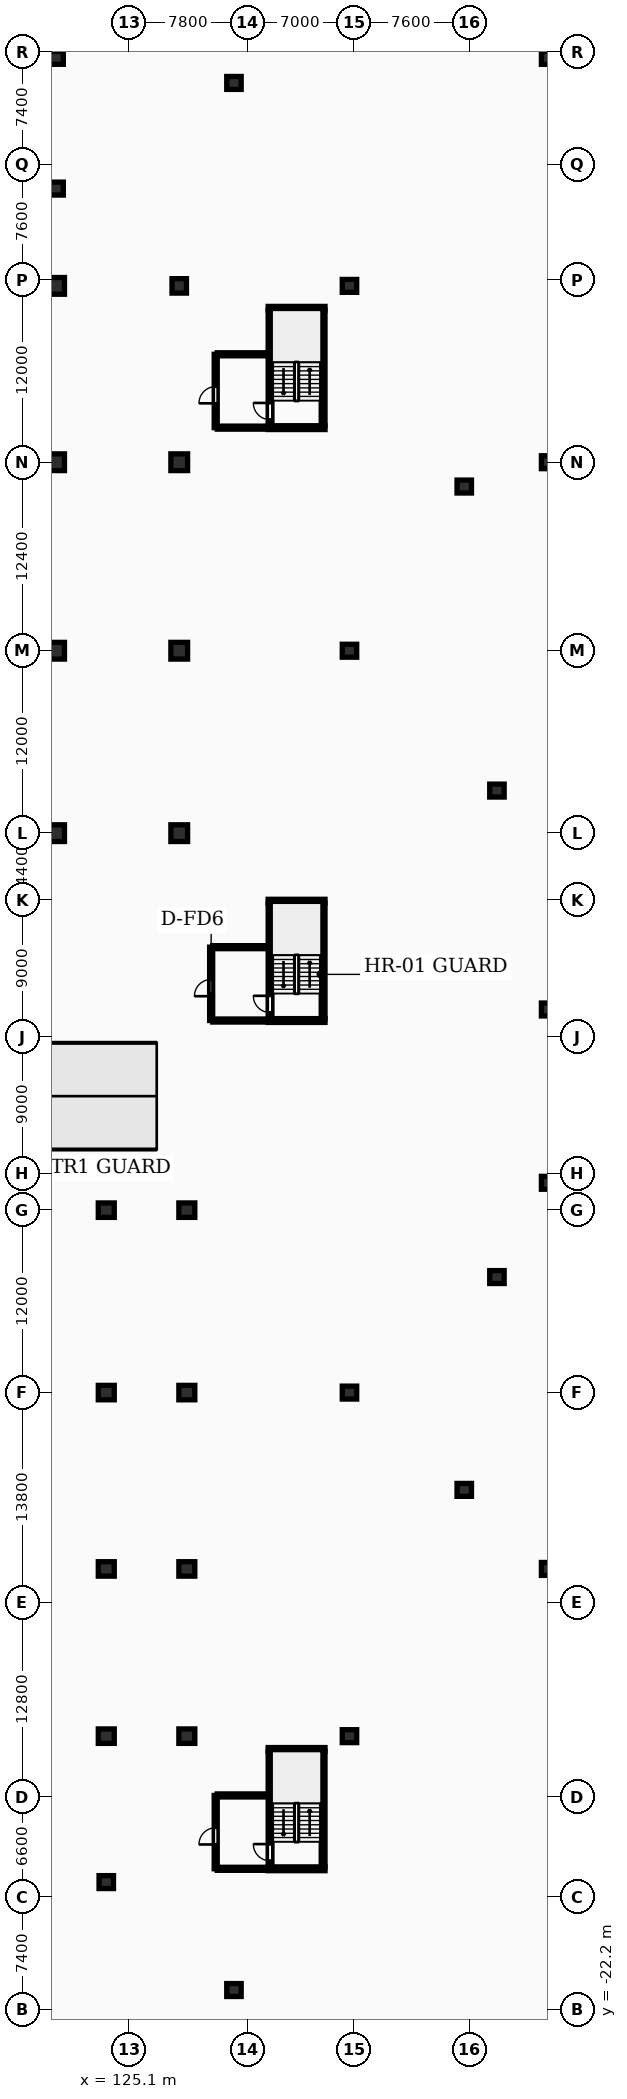
"""IFC4 building model, lengths in metres.
Left out: names, types, materials, properties, quantities, classifications, styles, units other than length and angle.
Written with IfcOpenShell. Run it as: python <this file> out.ifc"""

import sys

from ifc_helpers import new_model, si_unit, direction, frame, frame_2d, origin, origin_2d, place, context, subcontext, project, spatial, rectangle, circle, extrude, element, fill, save


model = new_model("IFC4")
c1 = context("Model", 3, precision=1e-05, world=origin(), true_north=direction((0.0, 1.0)))
c2 = subcontext(c1, "Body", "Model", "MODEL_VIEW")
j1 = project(units=[si_unit("LENGTHUNIT", "METRE"), si_unit("PLANEANGLEUNIT", "RADIAN")], contexts=[c1])
p1 = place(None, origin())
s1 = spatial("IfcSite", under=j1, at=p1, CompositionType="ELEMENT")
p2 = place(p1, origin())
s2 = spatial("IfcBuilding", under=s1, at=p2, CompositionType="ELEMENT")
p3 = place(p2, frame((0.0, 0.0, -7.2)))
s3 = spatial("IfcBuildingStorey", under=s2, at=p3, CompositionType="ELEMENT", Elevation=-7.2)
for number, where, z_axis, x_axis in (
    (1, (120.3, 55.2, 0.0), (0.0, 0.0, 1.0), (1.0, 0.0, 0.0)),
    (2, (120.3, 67.2, 0.0), (0.0, 0.0, 1.0), (1.0, 0.0, 0.0)),
    (3, (120.3, 79.6, 0.0), (0.0, 0.0, 1.0), (1.0, 0.0, 0.0)),
    (4, (120.3, 91.2, 0.0), (0.0, 0.0, 1.0), (1.0, 0.0, 0.0)),
    (5, (128.4, 55.2, 0.0), (0.0, 0.0, 1.0), (1.0, 0.0, 0.0)),
    (6, (128.4, 67.2, 0.0), (0.0, 0.0, 1.0), (1.0, 0.0, 0.0)),
    (7, (128.4, 79.6, 0.0), (0.0, 0.0, 1.0), (1.0, 0.0, 0.0)),
):
    element("IfcColumn", number, at=place(p3, frame(where, z_axis=z_axis, x_axis=x_axis)), inside=s3, PredefinedType="COLUMN", context=c2, shape_type="SweptSolid", body=[
        extrude(rectangle(XDim=1.1, YDim=1.1, at=origin_2d()), origin(), (0.0, 0.0, 1.0), 3.6),
    ])
p4 = place(p3, frame((128.4, 91.2, 0.0), z_axis=(0.0, 0.0, 1.0), x_axis=(1.0, 0.0, 0.0)))
e8 = element("IfcColumn", 8, at=p4, inside=s3, PredefinedType="COLUMN", context=c2, shape_type="SweptSolid", body=[
    extrude(circle(Radius=0.475, at=origin_2d()), origin(), (0.0, 0.0, 1.0), 3.6),
])
for number, where, z_axis, x_axis in (
    (9, (123.6, -4.2, 0.0), (0.0, 0.0, 1.0), (1.0, 0.0, 0.0)),
    (10, (123.6, 6.8, 0.0), (0.0, 0.0, 1.0), (1.0, 0.0, 0.0)),
    (11, (123.6, 18.4, 0.0), (0.0, 0.0, 1.0), (1.0, 0.0, 0.0)),
    (12, (123.6, 30.4, 0.0), (0.0, 0.0, 1.0), (1.0, 0.0, 0.0)),
    (13, (128.9, -4.2, 0.0), (0.0, 0.0, 1.0), (1.0, 0.0, 0.0)),
    (14, (128.9, 6.8, 0.0), (0.0, 0.0, 1.0), (1.0, 0.0, 0.0)),
    (15, (128.9, 18.4, 0.0), (0.0, 0.0, 1.0), (1.0, 0.0, 0.0)),
    (16, (128.9, 30.4, 0.0), (0.0, 0.0, 1.0), (1.0, 0.0, 0.0)),
):
    element("IfcColumn", number, at=place(p3, frame(where, z_axis=z_axis, x_axis=x_axis)), inside=s3, PredefinedType="COLUMN", context=c2, shape_type="SweptSolid", body=[
        extrude(rectangle(XDim=1.05, YDim=0.95, at=origin_2d()), origin(), (0.0, 0.0, 1.0), 3.6),
    ])
for number, where, z_axis, x_axis in (
    (17, (139.6, -4.2, 0.0), (0.0, 0.0, 1.0), (1.0, 0.0, 0.0)),
    (18, (139.6, 18.4, 0.0), (0.0, 0.0, 1.0), (1.0, 0.0, 0.0)),
    (19, (139.6, 67.2, 0.0), (0.0, 0.0, 1.0), (1.0, 0.0, 0.0)),
    (20, (139.6, 91.2, 0.0), (0.0, 0.0, 1.0), (1.0, 0.0, 0.0)),
    (21, (123.6, -13.8, 0.0), (0.0, 0.0, 1.0), (1.0, 0.0, 0.0)),
    (22, (120.3, 97.6, 0.0), (0.0, 0.0, 1.0), (1.0, 0.0, 0.0)),
    (23, (132.0, -20.9, 0.0), (0.0, 0.0, 1.0), (1.0, 0.0, 0.0)),
    (24, (132.0, 104.55, 0.0), (0.0, 0.0, 1.0), (1.0, 0.0, 0.0)),
    (25, (149.3, 26.0, 0.0), (0.0, 0.0, 1.0), (1.0, 0.0, 0.0)),
    (26, (149.3, 58.0, 0.0), (0.0, 0.0, 1.0), (1.0, 0.0, 0.0)),
    (27, (147.15, 12.0, 0.0), (0.0, 0.0, 1.0), (1.0, 0.0, 0.0)),
    (28, (147.15, 78.0, 0.0), (0.0, 0.0, 1.0), (1.0, 0.0, 0.0)),
    (29, (152.7, 6.8, 0.0), (0.0, 0.0, 1.0), (1.0, 0.0, 0.0)),
    (30, (152.7, 32.2, 0.0), (0.0, 0.0, 1.0), (1.0, 0.0, 0.0)),
    (31, (152.7, 43.6, 0.0), (0.0, 0.0, 1.0), (1.0, 0.0, 0.0)),
    (32, (152.7, 79.6, 0.0), (0.0, 0.0, 1.0), (1.0, 0.0, 0.0)),
    (33, (152.7, 106.2, 0.0), (0.0, 0.0, 1.0), (1.0, 0.0, 0.0)),
    (34, (120.3, 106.2, 0.0), (0.0, 0.0, 1.0), (1.0, 0.0, 0.0)),
):
    element("IfcColumn", number, at=place(p3, frame(where, z_axis=z_axis, x_axis=x_axis)), inside=s3, PredefinedType="COLUMN", context=c2, shape_type="SweptSolid", body=[
        extrude(rectangle(XDim=0.95, YDim=0.85, at=origin_2d()), origin(), (0.0, 0.0, 1.0), 3.6),
    ])
p5 = place(p3, frame((134.375, 43.0, 0.0), z_axis=(0.0, 0.0, 1.0), x_axis=(0.0, 1.0, 0.0)))
e35 = element("IfcWall", 35, at=p5, inside=s3, PredefinedType="SHEAR", context=c2, shape_type="SweptSolid", body=[
    extrude(rectangle(XDim=7.6, YDim=0.25, at=frame_2d((3.8, 0.0))), origin(), (0.0, 0.0, 1.0), 3.6),
])
p6 = place(p5, frame((0.4, 0.0, 0.0)))
e36 = element("IfcOpeningElement", 36, at=p6, cuts=e35, PredefinedType="OPENING", context=c2, shape_type="SweptSolid", body=[
    extrude(rectangle(XDim=1.1, YDim=2.1, at=frame_2d((0.55, 1.05))), frame((0.0, 0.135, 0.0), z_axis=(0.0, -1.0, 0.0), x_axis=(1.0, 0.0, 0.0)), (0.0, 0.0, 1.0), 0.27),
])
p7 = place(p3, frame((137.865, 43.0, 0.0), z_axis=(0.0, 0.0, 1.0), x_axis=(0.0, 1.0, 0.0)))
e37 = element("IfcWall", 37, at=p7, inside=s3, PredefinedType="SHEAR", context=c2, shape_type="SweptSolid", body=[
    extrude(rectangle(XDim=7.6, YDim=0.25, at=frame_2d((3.8, 0.0))), origin(), (0.0, 0.0, 1.0), 3.6),
])
for number, where, z_axis, x_axis in (
    (38, (134.25, 42.875, 0.0), (0.0, 0.0, 1.0), (1.0, 0.0, 0.0)),
    (39, (134.25, 50.725, 0.0), (0.0, 0.0, 1.0), (1.0, 0.0, 0.0)),
):
    element("IfcWall", number, at=place(p3, frame(where, z_axis=z_axis, x_axis=x_axis)), inside=s3, PredefinedType="SHEAR", context=c2, shape_type="SweptSolid", body=[
        extrude(rectangle(XDim=3.74, YDim=0.25, at=frame_2d((1.87, 0.0))), origin(), (0.0, 0.0, 1.0), 3.6),
    ])
p8 = place(p3, frame((130.5, 42.875, 0.0), z_axis=(0.0, 0.0, 1.0), x_axis=(0.0, 1.0, 0.0)))
e40 = element("IfcWall", 40, at=p8, inside=s3, PredefinedType="PARTITIONING", context=c2, shape_type="SweptSolid", body=[
    extrude(rectangle(XDim=4.825, YDim=0.2, at=frame_2d((2.413, 0.0))), origin(), (0.0, 0.0, 1.0), 3.3),
])
p9 = place(p8, frame((1.6, 0.0, 0.0)))
e41 = element("IfcOpeningElement", 41, at=p9, cuts=e40, PredefinedType="OPENING", context=c2, shape_type="SweptSolid", body=[
    extrude(rectangle(XDim=1.1, YDim=2.15, at=frame_2d((0.55, 1.075))), frame((0.0, 0.11, 0.0), z_axis=(0.0, -1.0, 0.0), x_axis=(1.0, 0.0, 0.0)), (0.0, 0.0, 1.0), 0.22),
])
for number, where, z_axis, x_axis in (
    (42, (130.6, 42.875, 0.0), (0.0, 0.0, 1.0), (1.0, 0.0, 0.0)),
    (43, (130.6, 47.7, 0.0), (0.0, 0.0, 1.0), (1.0, 0.0, 0.0)),
):
    element("IfcWall", number, at=place(p3, frame(where, z_axis=z_axis, x_axis=x_axis)), inside=s3, PredefinedType="PARTITIONING", context=c2, shape_type="SweptSolid", body=[
        extrude(rectangle(XDim=3.65, YDim=0.2, at=frame_2d((1.825, 0.0))), origin(), (0.0, 0.0, 1.0), 3.3),
    ])
p10 = place(p3, frame((134.375, 82.0, 0.0), z_axis=(0.0, 0.0, 1.0), x_axis=(0.0, 1.0, 0.0)))
e44 = element("IfcWall", 44, at=p10, inside=s3, PredefinedType="SHEAR", context=c2, shape_type="SweptSolid", body=[
    extrude(rectangle(XDim=7.6, YDim=0.25, at=frame_2d((3.8, 0.0))), origin(), (0.0, 0.0, 1.0), 3.6),
])
p11 = place(p10, frame((0.4, 0.0, 0.0)))
e45 = element("IfcOpeningElement", 45, at=p11, cuts=e44, PredefinedType="OPENING", context=c2, shape_type="SweptSolid", body=[
    extrude(rectangle(XDim=1.1, YDim=2.1, at=frame_2d((0.55, 1.05))), frame((0.0, 0.135, 0.0), z_axis=(0.0, -1.0, 0.0), x_axis=(1.0, 0.0, 0.0)), (0.0, 0.0, 1.0), 0.27),
])
p12 = place(p3, frame((137.865, 82.0, 0.0), z_axis=(0.0, 0.0, 1.0), x_axis=(0.0, 1.0, 0.0)))
e46 = element("IfcWall", 46, at=p12, inside=s3, PredefinedType="SHEAR", context=c2, shape_type="SweptSolid", body=[
    extrude(rectangle(XDim=7.6, YDim=0.25, at=frame_2d((3.8, 0.0))), origin(), (0.0, 0.0, 1.0), 3.6),
])
for number, where, z_axis, x_axis in (
    (47, (134.25, 81.875, 0.0), (0.0, 0.0, 1.0), (1.0, 0.0, 0.0)),
    (48, (134.25, 89.725, 0.0), (0.0, 0.0, 1.0), (1.0, 0.0, 0.0)),
):
    element("IfcWall", number, at=place(p3, frame(where, z_axis=z_axis, x_axis=x_axis)), inside=s3, PredefinedType="SHEAR", context=c2, shape_type="SweptSolid", body=[
        extrude(rectangle(XDim=3.74, YDim=0.25, at=frame_2d((1.87, 0.0))), origin(), (0.0, 0.0, 1.0), 3.6),
    ])
p13 = place(p3, frame((130.8, 81.875, 0.0), z_axis=(0.0, 0.0, 1.0), x_axis=(0.0, 1.0, 0.0)))
e49 = element("IfcWall", 49, at=p13, inside=s3, PredefinedType="PARTITIONING", context=c2, shape_type="SweptSolid", body=[
    extrude(rectangle(XDim=4.825, YDim=0.2, at=frame_2d((2.413, 0.0))), origin(), (0.0, 0.0, 1.0), 3.3),
])
p14 = place(p13, frame((1.6, 0.0, 0.0)))
e50 = element("IfcOpeningElement", 50, at=p14, cuts=e49, PredefinedType="OPENING", context=c2, shape_type="SweptSolid", body=[
    extrude(rectangle(XDim=1.1, YDim=2.15, at=frame_2d((0.55, 1.075))), frame((0.0, 0.11, 0.0), z_axis=(0.0, -1.0, 0.0), x_axis=(1.0, 0.0, 0.0)), (0.0, 0.0, 1.0), 0.22),
])
for number, where, z_axis, x_axis in (
    (51, (130.9, 81.875, 0.0), (0.0, 0.0, 1.0), (1.0, 0.0, 0.0)),
    (52, (130.9, 86.7, 0.0), (0.0, 0.0, 1.0), (1.0, 0.0, 0.0)),
):
    element("IfcWall", number, at=place(p3, frame(where, z_axis=z_axis, x_axis=x_axis)), inside=s3, PredefinedType="PARTITIONING", context=c2, shape_type="SweptSolid", body=[
        extrude(rectangle(XDim=3.35, YDim=0.2, at=frame_2d((1.675, 0.0))), origin(), (0.0, 0.0, 1.0), 3.3),
    ])
p15 = place(p3, frame((134.375, -12.8, 0.0), z_axis=(0.0, 0.0, 1.0), x_axis=(0.0, 1.0, 0.0)))
e53 = element("IfcWall", 53, at=p15, inside=s3, PredefinedType="SHEAR", context=c2, shape_type="SweptSolid", body=[
    extrude(rectangle(XDim=7.6, YDim=0.25, at=frame_2d((3.8, 0.0))), origin(), (0.0, 0.0, 1.0), 3.6),
])
p16 = place(p15, frame((0.4, 0.0, 0.0)))
e54 = element("IfcOpeningElement", 54, at=p16, cuts=e53, PredefinedType="OPENING", context=c2, shape_type="SweptSolid", body=[
    extrude(rectangle(XDim=1.1, YDim=2.1, at=frame_2d((0.55, 1.05))), frame((0.0, 0.135, 0.0), z_axis=(0.0, -1.0, 0.0), x_axis=(1.0, 0.0, 0.0)), (0.0, 0.0, 1.0), 0.27),
])
p17 = place(p3, frame((137.865, -12.8, 0.0), z_axis=(0.0, 0.0, 1.0), x_axis=(0.0, 1.0, 0.0)))
e55 = element("IfcWall", 55, at=p17, inside=s3, PredefinedType="SHEAR", context=c2, shape_type="SweptSolid", body=[
    extrude(rectangle(XDim=7.6, YDim=0.25, at=frame_2d((3.8, 0.0))), origin(), (0.0, 0.0, 1.0), 3.6),
])
for number, where, z_axis, x_axis in (
    (56, (134.25, -12.925, 0.0), (0.0, 0.0, 1.0), (1.0, 0.0, 0.0)),
    (57, (134.25, -5.075, 0.0), (0.0, 0.0, 1.0), (1.0, 0.0, 0.0)),
):
    element("IfcWall", number, at=place(p3, frame(where, z_axis=z_axis, x_axis=x_axis)), inside=s3, PredefinedType="SHEAR", context=c2, shape_type="SweptSolid", body=[
        extrude(rectangle(XDim=3.74, YDim=0.25, at=frame_2d((1.87, 0.0))), origin(), (0.0, 0.0, 1.0), 3.6),
    ])
p18 = place(p3, frame((130.8, -12.925, 0.0), z_axis=(0.0, 0.0, 1.0), x_axis=(0.0, 1.0, 0.0)))
e58 = element("IfcWall", 58, at=p18, inside=s3, PredefinedType="PARTITIONING", context=c2, shape_type="SweptSolid", body=[
    extrude(rectangle(XDim=4.825, YDim=0.2, at=frame_2d((2.413, 0.0))), origin(), (0.0, 0.0, 1.0), 3.3),
])
p19 = place(p18, frame((1.6, 0.0, 0.0)))
e59 = element("IfcOpeningElement", 59, at=p19, cuts=e58, PredefinedType="OPENING", context=c2, shape_type="SweptSolid", body=[
    extrude(rectangle(XDim=1.1, YDim=2.15, at=frame_2d((0.55, 1.075))), frame((0.0, 0.11, 0.0), z_axis=(0.0, -1.0, 0.0), x_axis=(1.0, 0.0, 0.0)), (0.0, 0.0, 1.0), 0.22),
])
for number, where, z_axis, x_axis in (
    (60, (130.9, -12.925, 0.0), (0.0, 0.0, 1.0), (1.0, 0.0, 0.0)),
    (61, (130.9, -8.1, 0.0), (0.0, 0.0, 1.0), (1.0, 0.0, 0.0)),
):
    element("IfcWall", number, at=place(p3, frame(where, z_axis=z_axis, x_axis=x_axis)), inside=s3, PredefinedType="PARTITIONING", context=c2, shape_type="SweptSolid", body=[
        extrude(rectangle(XDim=3.35, YDim=0.2, at=frame_2d((1.675, 0.0))), origin(), (0.0, 0.0, 1.0), 3.3),
    ])
p20 = place(p6, origin())
e62 = element("IfcDoor", 62, at=p20, inside=s3, OperationType="SINGLE_SWING_RIGHT", PredefinedType="DOOR", context=c2, shape_type="SweptSolid", body=[
    extrude(rectangle(XDim=1.1, YDim=2.1, at=frame_2d((0.55, 1.05))), frame((0.0, 0.025, 0.0), z_axis=(0.0, -1.0, 0.0), x_axis=(1.0, 0.0, 0.0)), (0.0, 0.0, 1.0), 0.05),
])
fill(e36, e62)
p21 = place(p9, origin())
e63 = element("IfcDoor", 63, at=p21, inside=s3, OperationType="SINGLE_SWING_LEFT", PredefinedType="DOOR", context=c2, shape_type="SweptSolid", body=[
    extrude(rectangle(XDim=1.1, YDim=2.15, at=frame_2d((0.55, 1.075))), frame((0.0, 0.025, 0.0), z_axis=(0.0, -1.0, 0.0), x_axis=(1.0, 0.0, 0.0)), (0.0, 0.0, 1.0), 0.05),
])
fill(e41, e63)
p22 = place(p11, origin())
e64 = element("IfcDoor", 64, at=p22, inside=s3, OperationType="SINGLE_SWING_RIGHT", PredefinedType="DOOR", context=c2, shape_type="SweptSolid", body=[
    extrude(rectangle(XDim=1.1, YDim=2.1, at=frame_2d((0.55, 1.05))), frame((0.0, 0.025, 0.0), z_axis=(0.0, -1.0, 0.0), x_axis=(1.0, 0.0, 0.0)), (0.0, 0.0, 1.0), 0.05),
])
fill(e45, e64)
p23 = place(p14, origin())
e65 = element("IfcDoor", 65, at=p23, inside=s3, OperationType="SINGLE_SWING_LEFT", PredefinedType="DOOR", context=c2, shape_type="SweptSolid", body=[
    extrude(rectangle(XDim=1.1, YDim=2.15, at=frame_2d((0.55, 1.075))), frame((0.0, 0.025, 0.0), z_axis=(0.0, -1.0, 0.0), x_axis=(1.0, 0.0, 0.0)), (0.0, 0.0, 1.0), 0.05),
])
fill(e50, e65)
p24 = place(p16, origin())
e66 = element("IfcDoor", 66, at=p24, inside=s3, OperationType="SINGLE_SWING_RIGHT", PredefinedType="DOOR", context=c2, shape_type="SweptSolid", body=[
    extrude(rectangle(XDim=1.1, YDim=2.1, at=frame_2d((0.55, 1.05))), frame((0.0, 0.025, 0.0), z_axis=(0.0, -1.0, 0.0), x_axis=(1.0, 0.0, 0.0)), (0.0, 0.0, 1.0), 0.05),
])
fill(e54, e66)
p25 = place(p19, origin())
e67 = element("IfcDoor", 67, at=p25, inside=s3, OperationType="SINGLE_SWING_LEFT", PredefinedType="DOOR", context=c2, shape_type="SweptSolid", body=[
    extrude(rectangle(XDim=1.1, YDim=2.15, at=frame_2d((0.55, 1.075))), frame((0.0, 0.025, 0.0), z_axis=(0.0, -1.0, 0.0), x_axis=(1.0, 0.0, 0.0)), (0.0, 0.0, 1.0), 0.05),
])
fill(e59, e67)
save(model, sys.argv[1])
